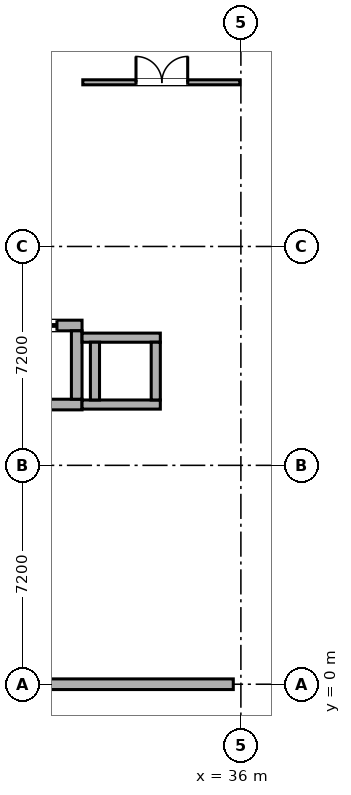
"""IFC4 building model, lengths in metres.
Left out: names, types, materials, properties, quantities, classifications, styles, units other than length and angle.
Written with IfcOpenShell. Run it as: python <this file> out.ifc"""

import sys

from ifc_helpers import new_model, si_unit, direction, frame, frame_2d, origin, origin_2d, place, context, subcontext, project, spatial, rectangle, hollow_rectangle, extrude, element, fill, save


model = new_model("IFC4")
c1 = context("Model", 3, precision=1e-05, world=origin(), true_north=direction((0.0, 1.0)))
c2 = subcontext(c1, "Body", "Model", "MODEL_VIEW")
j1 = project(units=[si_unit("LENGTHUNIT", "METRE"), si_unit("PLANEANGLEUNIT", "RADIAN")], contexts=[c1])
p1 = place(None, origin())
s1 = spatial("IfcSite", under=j1, at=p1, CompositionType="ELEMENT")
p2 = place(p1, origin())
s2 = spatial("IfcBuilding", under=s1, at=p2, CompositionType="ELEMENT")
p3 = place(p2, origin())
s3 = spatial("IfcBuildingStorey", under=s2, at=p3, CompositionType="ELEMENT", Elevation=0.0)
for number, where, z_axis, x_axis in (
    (1, (36.0, 0.0, 0.0), (0.0, 0.0, 1.0), (1.0, 0.0, 0.0)),
    (2, (36.0, 7.2, 0.0), (0.0, 0.0, 1.0), (1.0, 0.0, 0.0)),
    (3, (36.0, 14.4, 0.0), (0.0, 0.0, 1.0), (1.0, 0.0, 0.0)),
):
    element("IfcColumn", number, at=place(p3, frame(where, z_axis=z_axis, x_axis=x_axis)), inside=s3, PredefinedType="COLUMN", context=c2, shape_type="SweptSolid", body=[
        extrude(hollow_rectangle(XDim=0.5, YDim=0.5, WallThickness=0.022, at=origin_2d()), origin(), (0.0, 0.0, 1.0), 4.8),
    ])
p4 = place(p3, frame((27.25, 0.0, 0.0), z_axis=(0.0, 0.0, 1.0), x_axis=(1.0, 0.0, 0.0)))
e4 = element("IfcWall", 4, at=p4, inside=s3, PredefinedType="STANDARD", context=c2, shape_type="SweptSolid", body=[
    extrude(rectangle(XDim=8.5, YDim=0.35, at=frame_2d((4.25, 0.0))), origin(), (0.0, 0.0, 1.0), 4.055),
])
p5 = place(p3, frame((28.025, 9.2, 0.0), z_axis=(0.0, 0.0, 1.0), x_axis=(1.0, 0.0, 0.0)))
e5 = element("IfcWall", 5, at=p5, inside=s3, PredefinedType="SHEAR", context=c2, shape_type="SweptSolid", body=[
    extrude(rectangle(XDim=2.75, YDim=0.35, at=frame_2d((1.375, 0.0))), origin(), (0.0, 0.0, 1.0), 4.555),
])
p6 = place(p3, frame((28.025, 11.8, 0.0), z_axis=(0.0, 0.0, 1.0), x_axis=(1.0, 0.0, 0.0)))
e6 = element("IfcWall", 6, at=p6, inside=s3, PredefinedType="SHEAR", context=c2, shape_type="SweptSolid", body=[
    extrude(rectangle(XDim=2.75, YDim=0.35, at=frame_2d((1.375, 0.0))), origin(), (0.0, 0.0, 1.0), 4.555),
])
p7 = place(p6, frame((0.825, 0.0, 0.0)))
e7 = element("IfcOpeningElement", 7, at=p7, cuts=e6, PredefinedType="OPENING", context=c2, shape_type="SweptSolid", body=[
    extrude(rectangle(XDim=1.1, YDim=2.1, at=frame_2d((0.55, 1.05))), frame((0.0, 0.187, 0.0), z_axis=(0.0, -1.0, 0.0), x_axis=(1.0, 0.0, 0.0)), (0.0, 0.0, 1.0), 0.374),
])
p8 = place(p3, frame((30.6, 9.375, 0.0), z_axis=(0.0, 0.0, 1.0), x_axis=(0.0, 1.0, 0.0)))
e8 = element("IfcWall", 8, at=p8, inside=s3, PredefinedType="SHEAR", context=c2, shape_type="SweptSolid", body=[
    extrude(rectangle(XDim=2.25, YDim=0.35, at=frame_2d((1.125, 0.0))), origin(), (0.0, 0.0, 1.0), 4.555),
])
for number, where, z_axis, x_axis in (
    (9, (30.775, 9.2, 0.0), (0.0, 0.0, 1.0), (1.0, 0.0, 0.0)),
    (10, (30.775, 11.4, 0.0), (0.0, 0.0, 1.0), (1.0, 0.0, 0.0)),
):
    element("IfcWall", number, at=place(p3, frame(where, z_axis=z_axis, x_axis=x_axis)), inside=s3, PredefinedType="SHEAR", context=c2, shape_type="SweptSolid", body=[
        extrude(rectangle(XDim=2.575, YDim=0.3, at=frame_2d((1.288, 0.0))), origin(), (0.0, 0.0, 1.0), 4.555),
    ])
for number, where, z_axis, x_axis in (
    (11, (31.2, 9.35, 0.0), (0.0, 0.0, 1.0), (0.0, 1.0, 0.0)),
    (12, (33.2, 9.35, 0.0), (0.0, 0.0, 1.0), (0.0, 1.0, 0.0)),
):
    element("IfcWall", number, at=place(p3, frame(where, z_axis=z_axis, x_axis=x_axis)), inside=s3, PredefinedType="SHEAR", context=c2, shape_type="SweptSolid", body=[
        extrude(rectangle(XDim=1.9, YDim=0.3, at=frame_2d((0.95, 0.0))), origin(), (0.0, 0.0, 1.0), 4.555),
    ])
p9 = place(p3, frame((30.8, 19.8, 0.0), z_axis=(0.0, 0.0, 1.0), x_axis=(1.0, 0.0, 0.0)))
e13 = element("IfcWall", 13, at=p9, inside=s3, PredefinedType="PARTITIONING", context=c2, shape_type="SweptSolid", body=[
    extrude(rectangle(XDim=5.165, YDim=0.165, at=frame_2d((2.583, 0.0))), origin(), (0.0, 0.0, 1.0), 4.555),
])
p10 = place(p9, frame((1.75, 0.0, 0.0)))
e14 = element("IfcOpeningElement", 14, at=p10, cuts=e13, PredefinedType="OPENING", context=c2, shape_type="SweptSolid", body=[
    extrude(rectangle(XDim=1.7, YDim=2.12, at=frame_2d((0.85, 1.06))), frame((0.0, 0.094, 0.0), z_axis=(0.0, -1.0, 0.0), x_axis=(1.0, 0.0, 0.0)), (0.0, 0.0, 1.0), 0.189),
])
p11 = place(p7, origin())
e15 = element("IfcDoor", 15, at=p11, inside=s3, OperationType="SLIDING_TO_RIGHT", PredefinedType="DOOR", context=c2, shape_type="SweptSolid", body=[
    extrude(rectangle(XDim=1.1, YDim=2.1, at=frame_2d((0.55, 1.05))), frame((0.0, 0.025, 0.0), z_axis=(0.0, -1.0, 0.0), x_axis=(1.0, 0.0, 0.0)), (0.0, 0.0, 1.0), 0.05),
])
fill(e7, e15)
p12 = place(p10, origin())
e16 = element("IfcDoor", 16, at=p12, inside=s3, OperationType="DOUBLE_DOOR_SINGLE_SWING", PredefinedType="DOOR", context=c2, shape_type="SweptSolid", body=[
    extrude(rectangle(XDim=1.7, YDim=2.12, at=frame_2d((0.85, 1.06))), frame((0.0, 0.025, 0.0), z_axis=(0.0, -1.0, 0.0), x_axis=(1.0, 0.0, 0.0)), (0.0, 0.0, 1.0), 0.05),
])
fill(e14, e16)
save(model, sys.argv[1])
